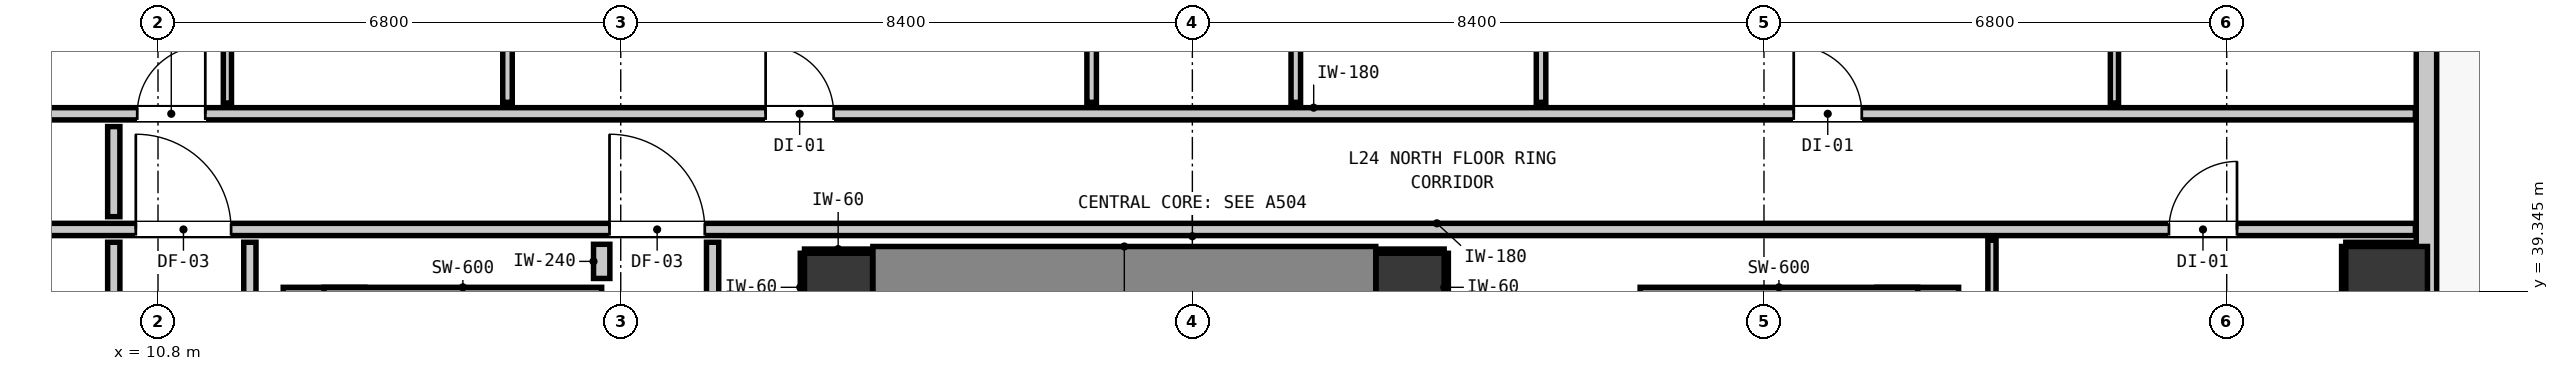
"""IFC4 building model, lengths in metres.
Left out: names, types, materials, properties, quantities, classifications, styles, units other than length and angle.
Written with IfcOpenShell. Run it as: python <this file> out.ifc"""

import sys

from ifc_helpers import new_model, si_unit, direction, frame, frame_2d, origin, origin_2d, place, context, subcontext, project, spatial, rectangle, extrude, element, fill, save


model = new_model("IFC4")
c1 = context("Model", 3, precision=1e-05, world=origin(), true_north=direction((0.0, 1.0)))
c2 = subcontext(c1, "Body", "Model", "MODEL_VIEW")
j1 = project(units=[si_unit("LENGTHUNIT", "METRE"), si_unit("PLANEANGLEUNIT", "RADIAN")], contexts=[c1])
p1 = place(None, origin())
s1 = spatial("IfcSite", under=j1, at=p1, CompositionType="ELEMENT")
p2 = place(p1, origin())
s2 = spatial("IfcBuilding", under=s1, at=p2, CompositionType="ELEMENT")
p3 = place(p2, frame((0.0, 0.0, 85.08)))
s3 = spatial("IfcBuildingStorey", under=s2, at=p3, CompositionType="ELEMENT", Elevation=85.08)
for number, where, z_axis, x_axis in (
    (1, (20.8, 39.4, 0.0), (0.0, 0.0, 1.0), (1.0, 0.0, 0.0)),
    (2, (29.2, 39.4, 0.0), (0.0, 0.0, 1.0), (1.0, 0.0, 0.0)),
):
    element("IfcColumn", number, at=place(p3, frame(where, z_axis=z_axis, x_axis=x_axis)), inside=s3, PredefinedType="COLUMN", context=c2, shape_type="SweptSolid", body=[
        extrude(rectangle(XDim=1.0, YDim=1.0, at=origin_2d()), origin(), (0.0, 0.0, 1.0), 3.32),
    ])
p4 = place(p3, frame((13.24, 31.205, 0.0), z_axis=(0.0, 0.0, 1.0), x_axis=(0.0, 1.0, 0.0)))
e3 = element("IfcWall", 3, at=p4, inside=s3, PredefinedType="SHEAR", context=c2, shape_type="SweptSolid", body=[
    extrude(rectangle(XDim=8.195, YDim=1.2, at=frame_2d((4.097, 0.0))), origin(), (0.0, 0.0, 1.0), 3.32),
])
p5 = place(p3, frame((13.24, 39.1, 0.0), z_axis=(0.0, 0.0, 1.0), x_axis=(1.0, 0.0, 0.0)))
e4 = element("IfcWall", 4, at=p5, inside=s3, PredefinedType="SHEAR", context=c2, shape_type="SweptSolid", body=[
    extrude(rectangle(XDim=4.08, YDim=0.6, at=frame_2d((2.04, 0.0))), origin(), (0.0, 0.0, 1.0), 3.32),
])
p6 = place(p3, frame((36.66, 31.205, 0.0), z_axis=(0.0, 0.0, 1.0), x_axis=(0.0, 1.0, 0.0)))
e5 = element("IfcWall", 5, at=p6, inside=s3, PredefinedType="SHEAR", context=c2, shape_type="SweptSolid", body=[
    extrude(rectangle(XDim=8.195, YDim=1.2, at=frame_2d((4.097, 0.0))), origin(), (0.0, 0.0, 1.0), 3.32),
])
p7 = place(p3, frame((32.58, 39.1, 0.0), z_axis=(0.0, 0.0, 1.0), x_axis=(1.0, 0.0, 0.0)))
e6 = element("IfcWall", 6, at=p7, inside=s3, PredefinedType="SHEAR", context=c2, shape_type="SweptSolid", body=[
    extrude(rectangle(XDim=4.08, YDim=0.6, at=frame_2d((2.04, 0.0))), origin(), (0.0, 0.0, 1.0), 3.32),
])
p8 = place(p3, frame((21.305, 39.4, 0.0), z_axis=(0.0, 0.0, 1.0), x_axis=(1.0, 0.0, 0.0)))
e7 = element("IfcWall", 7, at=p8, inside=s3, PredefinedType="SHEAR", context=c2, shape_type="SweptSolid", body=[
    extrude(rectangle(XDim=7.39, YDim=1.2, at=frame_2d((3.695, 0.0))), origin(), (0.0, 0.0, 1.0), 3.32),
])
p9 = place(p3, frame((43.55, 39.4, 0.0), z_axis=(0.0, 0.0, 1.0), x_axis=(1.0, 0.0, 0.0)))
e8 = element("IfcColumn", 8, at=p9, inside=s3, PredefinedType="COLUMN", context=c2, shape_type="SweptSolid", body=[
    extrude(rectangle(XDim=1.2, YDim=1.2, at=origin_2d()), origin(), (0.0, 0.0, 1.0), 3.32),
])
p10 = place(p3, frame((44.135, 51.035, 0.0), z_axis=(0.0, 0.0, 1.0), x_axis=(0.0, -1.0, 0.0)))
e9 = element("IfcWall", 9, at=p10, inside=s3, PredefinedType="STANDARD", context=c2, shape_type="SweptSolid", body=[
    extrude(rectangle(XDim=34.67, YDim=0.3, at=frame_2d((17.335, 0.0))), origin(), (0.0, 0.0, 1.0), 2.96),
])
p11 = place(p10, frame((0.901, 0.0, 0.0)))
e10 = element("IfcOpeningElement", 10, at=p11, cuts=e9, PredefinedType="OPENING", context=c2, shape_type="SweptSolid", body=[
    extrude(rectangle(XDim=1.0, YDim=2.15, at=frame_2d((0.5, 1.075))), frame((0.0, 0.16, 0.0), z_axis=(0.0, -1.0, 0.0), x_axis=(1.0, 0.0, 0.0)), (0.0, 0.0, 1.0), 0.32),
])
p12 = place(p10, frame((26.185, 0.0, 0.85)))
e11 = element("IfcOpeningElement", 11, at=p12, cuts=e9, PredefinedType="OPENING", context=c2, shape_type="SweptSolid", body=[
    extrude(rectangle(XDim=1.5, YDim=1.8, at=frame_2d((0.75, 0.9))), frame((0.0, 0.16, 0.0), z_axis=(0.0, -1.0, 0.0), x_axis=(1.0, 0.0, 0.0)), (0.0, 0.0, 1.0), 0.32),
])
p13 = place(p10, frame((13.401, 0.0, 0.85)))
e12 = element("IfcOpeningElement", 12, at=p13, cuts=e9, PredefinedType="OPENING", context=c2, shape_type="SweptSolid", body=[
    extrude(rectangle(XDim=1.5, YDim=1.8, at=frame_2d((0.75, 0.9))), frame((0.0, 0.16, 0.0), z_axis=(0.0, -1.0, 0.0), x_axis=(1.0, 0.0, 0.0)), (0.0, 0.0, 1.0), 0.32),
])
p14 = place(p3, frame((1.827, 40.25, 0.0), z_axis=(0.0, 0.0, 1.0), x_axis=(1.0, 0.0, 0.0)))
e13 = element("IfcWall", 13, at=p14, inside=s3, PredefinedType="PARTITIONING", context=c2, shape_type="SweptSolid", body=[
    extrude(rectangle(XDim=42.146, YDim=0.18, at=frame_2d((21.073, 0.0))), origin(), (0.0, 0.0, 1.0), 2.96),
])
p15 = place(p14, frame((15.608, 0.0, 0.0)))
e14 = element("IfcOpeningElement", 14, at=p15, cuts=e13, PredefinedType="OPENING", context=c2, shape_type="SweptSolid", body=[
    extrude(rectangle(XDim=1.4, YDim=2.15, at=frame_2d((0.7, 1.075))), frame((0.0, 0.1, 0.0), z_axis=(0.0, -1.0, 0.0), x_axis=(1.0, 0.0, 0.0)), (0.0, 0.0, 1.0), 0.2),
])
p16 = place(p14, frame((8.647, 0.0, 0.0)))
e15 = element("IfcOpeningElement", 15, at=p16, cuts=e13, PredefinedType="OPENING", context=c2, shape_type="SweptSolid", body=[
    extrude(rectangle(XDim=1.4, YDim=2.15, at=frame_2d((0.7, 1.075))), frame((0.0, 0.1, 0.0), z_axis=(0.0, -1.0, 0.0), x_axis=(1.0, 0.0, 0.0)), (0.0, 0.0, 1.0), 0.2),
])
p17 = place(p14, frame((38.524, 0.0, 0.0)))
e16 = element("IfcOpeningElement", 16, at=p17, cuts=e13, PredefinedType="OPENING", context=c2, shape_type="SweptSolid", body=[
    extrude(rectangle(XDim=1.0, YDim=2.15, at=frame_2d((0.5, 1.075))), frame((0.0, 0.1, 0.0), z_axis=(0.0, -1.0, 0.0), x_axis=(1.0, 0.0, 0.0)), (0.0, 0.0, 1.0), 0.2),
])
p18 = place(p3, frame((1.827, 41.95, 0.0), z_axis=(0.0, 0.0, 1.0), x_axis=(1.0, 0.0, 0.0)))
e17 = element("IfcWall", 17, at=p18, inside=s3, PredefinedType="PARTITIONING", context=c2, shape_type="SweptSolid", body=[
    extrude(rectangle(XDim=42.146, YDim=0.18, at=frame_2d((21.073, 0.0))), origin(), (0.0, 0.0, 1.0), 2.96),
])
p19 = place(p18, frame((8.668, 0.0, 0.0)))
e18 = element("IfcOpeningElement", 18, at=p19, cuts=e17, PredefinedType="OPENING", context=c2, shape_type="SweptSolid", body=[
    extrude(rectangle(XDim=1.0, YDim=2.15, at=frame_2d((0.5, 1.075))), frame((0.0, 0.1, 0.0), z_axis=(0.0, -1.0, 0.0), x_axis=(1.0, 0.0, 0.0)), (0.0, 0.0, 1.0), 0.2),
])
p20 = place(p18, frame((17.902, 0.0, 0.0)))
e19 = element("IfcOpeningElement", 19, at=p20, cuts=e17, PredefinedType="OPENING", context=c2, shape_type="SweptSolid", body=[
    extrude(rectangle(XDim=1.0, YDim=2.15, at=frame_2d((0.5, 1.075))), frame((0.0, 0.1, 0.0), z_axis=(0.0, -1.0, 0.0), x_axis=(1.0, 0.0, 0.0)), (0.0, 0.0, 1.0), 0.2),
])
p21 = place(p18, frame((33.01, 0.0, 0.0)))
e20 = element("IfcOpeningElement", 20, at=p21, cuts=e17, PredefinedType="OPENING", context=c2, shape_type="SweptSolid", body=[
    extrude(rectangle(XDim=1.0, YDim=2.15, at=frame_2d((0.5, 1.075))), frame((0.0, 0.1, 0.0), z_axis=(0.0, -1.0, 0.0), x_axis=(1.0, 0.0, 0.0)), (0.0, 0.0, 1.0), 0.2),
])
p22 = place(p3, frame((17.32, 39.53, 0.0), z_axis=(0.0, 0.0, 1.0), x_axis=(0.0, 1.0, 0.0)))
e21 = element("IfcWall", 21, at=p22, inside=s3, PredefinedType="PARTITIONING", context=c2, shape_type="SweptSolid", body=[
    extrude(rectangle(XDim=0.502, YDim=0.24, at=frame_2d((0.251, 0.0))), origin(), (0.0, 0.0, 1.0), 2.96),
])
p23 = place(p3, frame((10.15, 37.313, 0.0), z_axis=(0.0, 0.0, 1.0), x_axis=(0.0, 1.0, 0.0)))
e22 = element("IfcWall", 22, at=p23, inside=s3, PredefinedType="PARTITIONING", context=c2, shape_type="SweptSolid", body=[
    extrude(rectangle(XDim=2.749, YDim=0.18, at=frame_2d((1.375, 0.0))), origin(), (0.0, 0.0, 1.0), 2.96),
])
p24 = place(p3, frame((10.15, 40.438, 0.0), z_axis=(0.0, 0.0, 1.0), x_axis=(0.0, 1.0, 0.0)))
e23 = element("IfcWall", 23, at=p24, inside=s3, PredefinedType="PARTITIONING", context=c2, shape_type="SweptSolid", body=[
    extrude(rectangle(XDim=1.324, YDim=0.18, at=frame_2d((0.662, 0.0))), origin(), (0.0, 0.0, 1.0), 2.96),
])
p25 = place(p3, frame((12.15, 21.368, 0.0), z_axis=(0.0, 0.0, 1.0), x_axis=(0.0, 1.0, 0.0)))
e24 = element("IfcWall", 24, at=p25, inside=s3, PredefinedType="PARTITIONING", context=c2, shape_type="SweptSolid", body=[
    extrude(rectangle(XDim=18.694, YDim=0.18, at=frame_2d((9.347, 0.0))), origin(), (0.0, 0.0, 1.0), 2.96),
])
p26 = place(p3, frame((18.95, 38.918, 0.0), z_axis=(0.0, 0.0, 1.0), x_axis=(0.0, 1.0, 0.0)))
e25 = element("IfcWall", 25, at=p26, inside=s3, PredefinedType="PARTITIONING", context=c2, shape_type="SweptSolid", body=[
    extrude(rectangle(XDim=1.144, YDim=0.18, at=frame_2d((0.572, 0.0))), origin(), (0.0, 0.0, 1.0), 2.96),
])
p27 = place(p3, frame((15.936, 42.118, 0.0), z_axis=(0.0, 0.0, 1.0), x_axis=(0.0, 1.0, 0.0)))
e26 = element("IfcWall", 26, at=p27, inside=s3, PredefinedType="PARTITIONING", context=c2, shape_type="SweptSolid", body=[
    extrude(rectangle(XDim=5.934, YDim=0.14, at=frame_2d((2.967, 0.0))), origin(), (0.0, 0.0, 1.0), 2.96),
])
p28 = place(p3, frame((24.52, 42.118, 0.0), z_axis=(0.0, 0.0, 1.0), x_axis=(0.0, 1.0, 0.0)))
e27 = element("IfcWall", 27, at=p28, inside=s3, PredefinedType="PARTITIONING", context=c2, shape_type="SweptSolid", body=[
    extrude(rectangle(XDim=5.934, YDim=0.14, at=frame_2d((2.967, 0.0))), origin(), (0.0, 0.0, 1.0), 2.96),
])
p29 = place(p28, frame((2.507, 0.0, 0.0)))
e28 = element("IfcOpeningElement", 28, at=p29, cuts=e27, PredefinedType="OPENING", context=c2, shape_type="SweptSolid", body=[
    extrude(rectangle(XDim=0.9, YDim=2.1, at=frame_2d((0.45, 1.05))), frame((0.0, 0.08, 0.0), z_axis=(0.0, -1.0, 0.0), x_axis=(1.0, 0.0, 0.0)), (0.0, 0.0, 1.0), 0.16),
])
p30 = place(p3, frame((27.52, 42.118, 0.0), z_axis=(0.0, 0.0, 1.0), x_axis=(0.0, 1.0, 0.0)))
e29 = element("IfcWall", 29, at=p30, inside=s3, PredefinedType="PARTITIONING", context=c2, shape_type="SweptSolid", body=[
    extrude(rectangle(XDim=5.934, YDim=0.14, at=frame_2d((2.967, 0.0))), origin(), (0.0, 0.0, 1.0), 2.96),
])
p31 = place(p3, frame((31.124, 42.118, 0.0), z_axis=(0.0, 0.0, 1.0), x_axis=(0.0, 1.0, 0.0)))
e30 = element("IfcWall", 30, at=p31, inside=s3, PredefinedType="PARTITIONING", context=c2, shape_type="SweptSolid", body=[
    extrude(rectangle(XDim=5.934, YDim=0.14, at=frame_2d((2.967, 0.0))), origin(), (0.0, 0.0, 1.0), 2.96),
])
p32 = place(p31, frame((2.527, 0.0, 0.0)))
e31 = element("IfcOpeningElement", 31, at=p32, cuts=e30, PredefinedType="OPENING", context=c2, shape_type="SweptSolid", body=[
    extrude(rectangle(XDim=0.86, YDim=2.02, at=frame_2d((0.43, 1.01))), frame((0.0, 0.08, 0.0), z_axis=(0.0, -1.0, 0.0), x_axis=(1.0, 0.0, 0.0)), (0.0, 0.0, 1.0), 0.16),
])
p33 = place(p3, frame((11.82, 42.108, 0.0), z_axis=(0.0, 0.0, 1.0), x_axis=(0.0, 1.0, 0.0)))
e32 = element("IfcWall", 32, at=p33, inside=s3, PredefinedType="PARTITIONING", context=c2, shape_type="SweptSolid", body=[
    extrude(rectangle(XDim=5.954, YDim=0.12, at=frame_2d((2.977, 0.0))), origin(), (0.0, 0.0, 1.0), 2.96),
])
p34 = place(p33, frame((2.53, 0.0, 0.0)))
e33 = element("IfcOpeningElement", 33, at=p34, cuts=e32, PredefinedType="OPENING", context=c2, shape_type="SweptSolid", body=[
    extrude(rectangle(XDim=0.9, YDim=2.1, at=frame_2d((0.45, 1.05))), frame((0.0, 0.07, 0.0), z_axis=(0.0, -1.0, 0.0), x_axis=(1.0, 0.0, 0.0)), (0.0, 0.0, 1.0), 0.14),
])
p35 = place(p3, frame((37.75, 35.006, 0.0), z_axis=(0.0, 0.0, 1.0), x_axis=(0.0, 1.0, 0.0)))
e34 = element("IfcWall", 34, at=p35, inside=s3, PredefinedType="PARTITIONING", context=c2, shape_type="SweptSolid", body=[
    extrude(rectangle(XDim=5.086, YDim=0.12, at=frame_2d((2.543, 0.0))), origin(), (0.0, 0.0, 1.0), 2.96),
])
p36 = place(p3, frame((39.55, 42.108, 0.0), z_axis=(0.0, 0.0, 1.0), x_axis=(0.0, 1.0, 0.0)))
e35 = element("IfcWall", 35, at=p36, inside=s3, PredefinedType="PARTITIONING", context=c2, shape_type="SweptSolid", body=[
    extrude(rectangle(XDim=5.954, YDim=0.12, at=frame_2d((2.977, 0.0))), origin(), (0.0, 0.0, 1.0), 2.345),
])
p37 = place(p36, frame((2.517, 0.0, 0.0)))
e36 = element("IfcOpeningElement", 36, at=p37, cuts=e35, PredefinedType="OPENING", context=c2, shape_type="SweptSolid", body=[
    extrude(rectangle(XDim=0.9, YDim=2.1, at=frame_2d((0.45, 1.05))), frame((0.0, 0.07, 0.0), z_axis=(0.0, -1.0, 0.0), x_axis=(1.0, 0.0, 0.0)), (0.0, 0.0, 1.0), 0.14),
])
p38 = place(p3, frame((20.3, 39.932, 0.0), z_axis=(0.0, 0.0, 1.0), x_axis=(1.0, 0.0, 0.0)))
e37 = element("IfcWall", 37, at=p38, inside=s3, PredefinedType="PARTITIONING", context=c2, shape_type="SweptSolid", body=[
    extrude(rectangle(XDim=0.99, YDim=0.06, at=frame_2d((0.495, 0.0))), origin(), (0.0, 0.0, 1.0), 1.45),
])
p39 = place(p3, frame((20.268, 38.9, 0.0), z_axis=(0.0, 0.0, 1.0), x_axis=(0.0, 1.0, 0.0)))
e38 = element("IfcWall", 38, at=p39, inside=s3, PredefinedType="PARTITIONING", context=c2, shape_type="SweptSolid", body=[
    extrude(rectangle(XDim=1.0, YDim=0.06, at=frame_2d((0.5, 0.0))), origin(), (0.0, 0.0, 1.0), 1.45),
])
p40 = place(p3, frame((28.71, 39.932, 0.0), z_axis=(0.0, 0.0, 1.0), x_axis=(1.0, 0.0, 0.0)))
e39 = element("IfcWall", 39, at=p40, inside=s3, PredefinedType="PARTITIONING", context=c2, shape_type="SweptSolid", body=[
    extrude(rectangle(XDim=0.99, YDim=0.06, at=frame_2d((0.495, 0.0))), origin(), (0.0, 0.0, 1.0), 1.45),
])
p41 = place(p3, frame((29.732, 38.9, 0.0), z_axis=(0.0, 0.0, 1.0), x_axis=(0.0, 1.0, 0.0)))
e40 = element("IfcWall", 40, at=p41, inside=s3, PredefinedType="PARTITIONING", context=c2, shape_type="SweptSolid", body=[
    extrude(rectangle(XDim=1.0, YDim=0.06, at=frame_2d((0.5, 0.0))), origin(), (0.0, 0.0, 1.0), 1.45),
])
p42 = place(p3, frame((42.95, 40.032, 0.0), z_axis=(0.0, 0.0, 1.0), x_axis=(1.0, 0.0, 0.0)))
e41 = element("IfcWall", 41, at=p42, inside=s3, PredefinedType="PARTITIONING", context=c2, shape_type="SweptSolid", body=[
    extrude(rectangle(XDim=1.02, YDim=0.06, at=frame_2d((0.51, 0.0))), origin(), (0.0, 0.0, 1.0), 1.45),
])
p43 = place(p3, frame((42.918, 38.8, 0.0), z_axis=(0.0, 0.0, 1.0), x_axis=(0.0, 1.0, 0.0)))
e42 = element("IfcWall", 42, at=p43, inside=s3, PredefinedType="PARTITIONING", context=c2, shape_type="SweptSolid", body=[
    extrude(rectangle(XDim=1.2, YDim=0.06, at=frame_2d((0.6, 0.0))), origin(), (0.0, 0.0, 1.0), 1.45),
])
p44 = place(p15, origin())
e43 = element("IfcDoor", 43, at=p44, inside=s3, OperationType="SINGLE_SWING_LEFT", PredefinedType="DOOR", context=c2, shape_type="SweptSolid", body=[
    extrude(rectangle(XDim=1.4, YDim=2.15, at=frame_2d((0.7, 1.075))), frame((0.0, 0.025, 0.0), z_axis=(0.0, -1.0, 0.0), x_axis=(1.0, 0.0, 0.0)), (0.0, 0.0, 1.0), 0.05),
])
fill(e14, e43)
p45 = place(p16, origin())
e44 = element("IfcDoor", 44, at=p45, inside=s3, OperationType="SINGLE_SWING_LEFT", PredefinedType="DOOR", context=c2, shape_type="SweptSolid", body=[
    extrude(rectangle(XDim=1.4, YDim=2.15, at=frame_2d((0.7, 1.075))), frame((0.0, 0.025, 0.0), z_axis=(0.0, -1.0, 0.0), x_axis=(1.0, 0.0, 0.0)), (0.0, 0.0, 1.0), 0.05),
])
fill(e15, e44)
p46 = place(p19, origin())
e45 = element("IfcDoor", 45, at=p46, inside=s3, OperationType="SINGLE_SWING_RIGHT", PredefinedType="DOOR", context=c2, shape_type="SweptSolid", body=[
    extrude(rectangle(XDim=1.0, YDim=2.15, at=frame_2d((0.5, 1.075))), frame((0.0, 0.025, 0.0), z_axis=(0.0, -1.0, 0.0), x_axis=(1.0, 0.0, 0.0)), (0.0, 0.0, 1.0), 0.05),
])
fill(e18, e45)
p47 = place(p20, origin())
e46 = element("IfcDoor", 46, at=p47, inside=s3, OperationType="SINGLE_SWING_LEFT", PredefinedType="DOOR", context=c2, shape_type="SweptSolid", body=[
    extrude(rectangle(XDim=1.0, YDim=2.15, at=frame_2d((0.5, 1.075))), frame((0.0, 0.025, 0.0), z_axis=(0.0, -1.0, 0.0), x_axis=(1.0, 0.0, 0.0)), (0.0, 0.0, 1.0), 0.05),
])
fill(e19, e46)
p48 = place(p21, origin())
e47 = element("IfcDoor", 47, at=p48, inside=s3, OperationType="SINGLE_SWING_LEFT", PredefinedType="DOOR", context=c2, shape_type="SweptSolid", body=[
    extrude(rectangle(XDim=1.0, YDim=2.15, at=frame_2d((0.5, 1.075))), frame((0.0, 0.025, 0.0), z_axis=(0.0, -1.0, 0.0), x_axis=(1.0, 0.0, 0.0)), (0.0, 0.0, 1.0), 0.05),
])
fill(e20, e47)
p49 = place(p17, origin())
e48 = element("IfcDoor", 48, at=p49, inside=s3, OperationType="SINGLE_SWING_RIGHT", PredefinedType="DOOR", context=c2, shape_type="SweptSolid", body=[
    extrude(rectangle(XDim=1.0, YDim=2.15, at=frame_2d((0.5, 1.075))), frame((0.0, 0.025, 0.0), z_axis=(0.0, -1.0, 0.0), x_axis=(1.0, 0.0, 0.0)), (0.0, 0.0, 1.0), 0.05),
])
fill(e16, e48)
save(model, sys.argv[1])
